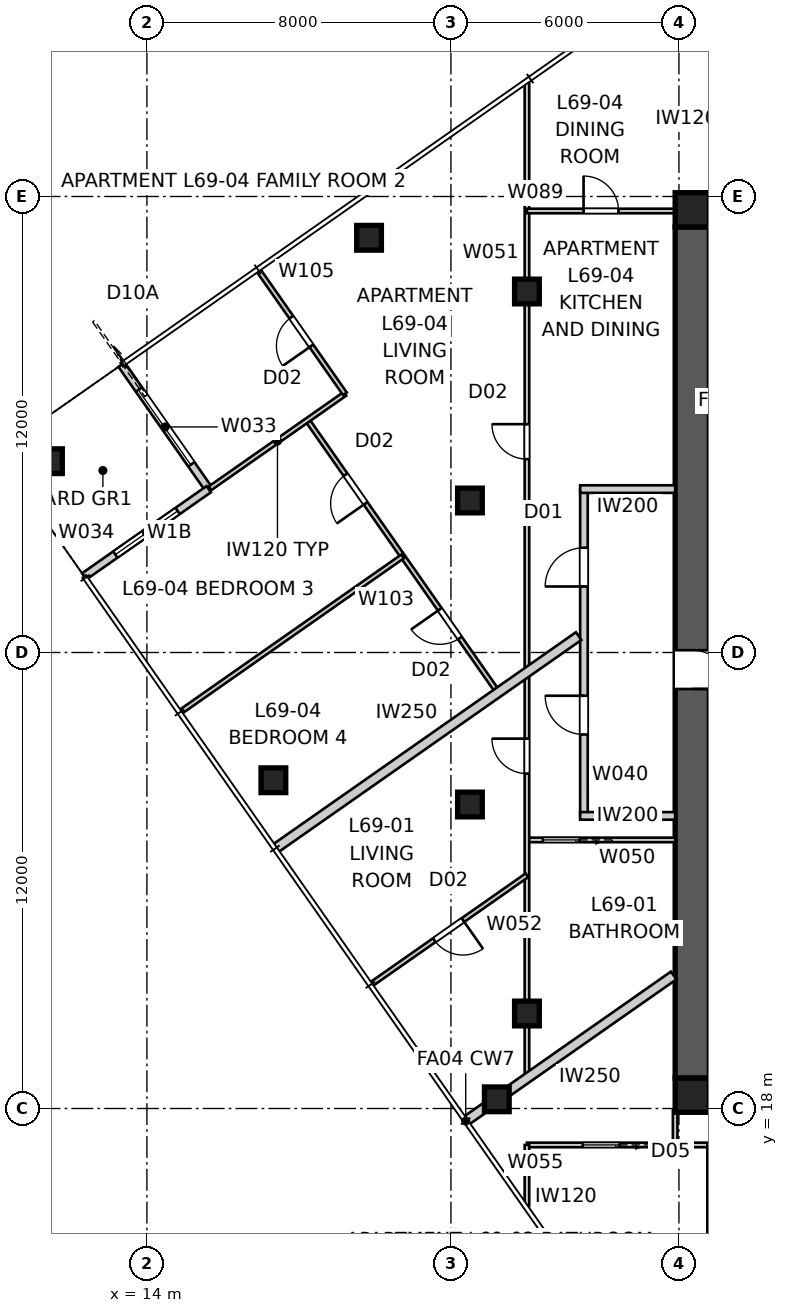
"""IFC4 building model, lengths in metres.
Left out: names, types, materials, properties, quantities, classifications, styles, units other than length and angle.
Written with IfcOpenShell. Run it as: python <this file> out.ifc"""

import sys

from ifc_helpers import new_model, si_unit, direction, frame, frame_2d, origin, origin_2d, place, context, subcontext, project, spatial, polyline, rectangle, outline, extrude, element, fill, save


model = new_model("IFC4")
c1 = context("Model", 3, precision=1e-05, world=origin(), true_north=direction((0.0, 1.0)))
c2 = subcontext(c1, "Body", "Model", "MODEL_VIEW")
j1 = project(units=[si_unit("LENGTHUNIT", "METRE"), si_unit("PLANEANGLEUNIT", "RADIAN")], contexts=[c1])
p1 = place(None, origin())
s1 = spatial("IfcSite", under=j1, at=p1, CompositionType="ELEMENT")
p2 = place(p1, origin())
s2 = spatial("IfcBuilding", under=s1, at=p2, CompositionType="ELEMENT")
p3 = place(p2, frame((0.0, 0.0, 250.6)))
s3 = spatial("IfcBuildingStorey", under=s2, at=p3, CompositionType="ELEMENT", Elevation=250.6)
for number, where, z_axis, x_axis in (
    (1, (28.8, 41.65, 0.0), (0.0, 0.0, 1.0), (1.0, 0.0, 0.0)),
    (2, (51.2, 18.35, 0.0), (0.0, 0.0, 1.0), (-1.0, 0.0, 0.0)),
):
    element("IfcWall", number, at=place(p3, frame(where, z_axis=z_axis, x_axis=x_axis)), inside=s3, PredefinedType="SHEAR", context=c2, shape_type="SweptSolid", body=[
        extrude(outline(polyline([(0.0, -0.45), (22.4, -0.45), (22.4, -0.025), (22.85, -0.025), (22.85, 0.025), (22.4, 0.025), (22.4, 0.45), (0.0, 0.45), (0.0, 0.025), (-0.45, 0.025), (-0.45, -0.025), (0.0, -0.025), (0.0, -0.45)])), origin(), (0.0, 0.0, 1.0), 3.4),
    ])
p4 = place(p3, frame((28.35, 41.2, 0.0), z_axis=(0.0, 0.0, 1.0), x_axis=(0.0, -1.0, 0.0)))
e3 = element("IfcWall", 3, at=p4, inside=s3, PredefinedType="SHEAR", context=c2, shape_type="SweptSolid", body=[
    extrude(outline(polyline([(0.0, -0.45), (22.4, -0.45), (22.4, -0.025), (22.85, -0.025), (22.85, 0.025), (22.4, 0.025), (22.4, 0.45), (0.0, 0.45), (0.0, 0.025), (-0.45, 0.025), (-0.45, -0.025), (0.0, -0.025), (0.0, -0.45)])), origin(), (0.0, 0.0, 1.0), 3.4),
])
p5 = place(p4, frame((11.14, 0.0, 0.0)))
e4 = element("IfcOpeningElement", 4, at=p5, cuts=e3, PredefinedType="OPENING", context=c2, shape_type="SweptSolid", body=[
    extrude(rectangle(XDim=1.02, YDim=2.4, at=frame_2d((0.51, 1.2))), frame((0.0, 0.46, 0.0), z_axis=(0.0, -1.0, 0.0), x_axis=(1.0, 0.0, 0.0)), (0.0, 0.0, 1.0), 0.92),
])
for number, where, z_axis, x_axis in (
    (5, (28.35, 18.35, 0.0), (0.0, 0.0, 1.0), (1.0, 0.0, 0.0)),
    (6, (28.35, 41.65, 0.0), (0.0, 0.0, 1.0), (1.0, 0.0, 0.0)),
):
    element("IfcColumn", number, at=place(p3, frame(where, z_axis=z_axis, x_axis=x_axis)), inside=s3, PredefinedType="COLUMN", context=c2, shape_type="SweptSolid", body=[
        extrude(rectangle(XDim=0.9, YDim=0.9, at=origin_2d()), origin(), (0.0, 0.0, 1.0), 3.4),
    ])
for number, where, z_axis, x_axis in (
    (7, (19.845, 40.914, 0.0), (0.0, 0.0, 1.0), (1.0, 0.0, 0.0)),
    (8, (11.449, 35.034, 0.0), (0.0, 0.0, 1.0), (1.0, 0.0, 0.0)),
    (9, (17.328, 26.638, 0.0), (0.0, 0.0, 1.0), (1.0, 0.0, 0.0)),
    (10, (23.207, 18.242, 0.0), (0.0, 0.0, 1.0), (1.0, 0.0, 0.0)),
    (11, (24.0, 39.5, 0.0), (0.0, 0.0, 1.0), (1.0, 0.0, 0.0)),
    (12, (22.5, 34.0, 0.0), (0.0, 0.0, 1.0), (1.0, 0.0, 0.0)),
    (13, (22.5, 26.0, 0.0), (0.0, 0.0, 1.0), (1.0, 0.0, 0.0)),
    (14, (24.0, 20.5, 0.0), (0.0, 0.0, 1.0), (1.0, 0.0, 0.0)),
):
    element("IfcColumn", number, at=place(p3, frame(where, z_axis=z_axis, x_axis=x_axis)), inside=s3, PredefinedType="COLUMN", context=c2, shape_type="SweptSolid", body=[
        extrude(rectangle(XDim=0.65, YDim=0.65, at=origin_2d()), origin(), (0.0, 0.0, 1.0), 3.4),
    ])
p6 = place(p3, frame((13.333, 37.574, 0.0), z_axis=(0.0, 0.0, 1.0), x_axis=(0.573556557423, -0.819165963305, 0.0)))
e15 = element("IfcWall", 15, at=p6, inside=s3, PredefinedType="SOLIDWALL", context=c2, shape_type="SweptSolid", body=[
    extrude(rectangle(XDim=4.0, YDim=0.2, at=frame_2d((2.0, 0.0))), origin(), (0.0, 0.0, 1.0), 3.25),
])
p7 = place(p6, frame((0.8, 0.0, 0.0)))
e16 = element("IfcOpeningElement", 16, at=p7, cuts=e15, PredefinedType="OPENING", context=c2, shape_type="SweptSolid", body=[
    extrude(rectangle(XDim=2.4, YDim=2.1, at=frame_2d((1.2, 1.05))), frame((0.0, 0.11, 0.0), z_axis=(0.0, -1.0, 0.0), x_axis=(1.0, 0.0, 0.0)), (0.0, 0.0, 1.0), 0.22),
])
p8 = place(p3, frame((15.627, 34.298, 0.0), z_axis=(0.0, 0.0, 1.0), x_axis=(-0.819137286189, -0.573597512525, 0.0)))
e17 = element("IfcWall", 17, at=p8, inside=s3, PredefinedType="SOLIDWALL", context=c2, shape_type="SweptSolid", body=[
    extrude(rectangle(XDim=4.0, YDim=0.2, at=frame_2d((2.0, 0.0))), origin(), (0.0, 0.0, 1.0), 3.25),
])
p9 = place(p8, frame((1.0, 0.0, 0.45)))
e18 = element("IfcOpeningElement", 18, at=p9, cuts=e17, PredefinedType="OPENING", context=c2, shape_type="SweptSolid", body=[
    extrude(rectangle(XDim=2.0, YDim=1.8, at=frame_2d((1.0, 0.9))), frame((0.0, 0.11, 0.0), z_axis=(0.0, -1.0, 0.0), x_axis=(1.0, 0.0, 0.0)), (0.0, 0.0, 1.0), 0.22),
])
p10 = place(p3, frame((25.5, 25.7, 0.0), z_axis=(0.0, 0.0, 1.0), x_axis=(0.0, 1.0, 0.0)))
e19 = element("IfcWall", 19, at=p10, inside=s3, PredefinedType="PARTITIONING", context=c2, shape_type="SweptSolid", body=[
    extrude(rectangle(XDim=8.6, YDim=0.2, at=frame_2d((4.3, 0.0))), origin(), (0.0, 0.0, 1.0), 3.25),
])
p11 = place(p10, frame((2.142, 0.0, 0.0)))
e20 = element("IfcOpeningElement", 20, at=p11, cuts=e19, PredefinedType="OPENING", context=c2, shape_type="SweptSolid", body=[
    extrude(rectangle(XDim=1.02, YDim=2.34, at=frame_2d((0.51, 1.17))), frame((0.0, 0.11, 0.0), z_axis=(0.0, -1.0, 0.0), x_axis=(1.0, 0.0, 0.0)), (0.0, 0.0, 1.0), 0.22),
])
p12 = place(p10, frame((6.037, 0.0, 0.0)))
e21 = element("IfcOpeningElement", 21, at=p12, cuts=e19, PredefinedType="OPENING", context=c2, shape_type="SweptSolid", body=[
    extrude(rectangle(XDim=1.02, YDim=2.34, at=frame_2d((0.51, 1.17))), frame((0.0, 0.11, 0.0), z_axis=(0.0, -1.0, 0.0), x_axis=(1.0, 0.0, 0.0)), (0.0, 0.0, 1.0), 0.22),
])
for number, where, z_axis, x_axis in (
    (22, (27.9, 34.3, 0.0), (0.0, 0.0, 1.0), (-1.0, 0.0, 0.0)),
    (23, (27.9, 25.7, 0.0), (0.0, 0.0, 1.0), (-1.0, 0.0, 0.0)),
):
    element("IfcWall", number, at=place(p3, frame(where, z_axis=z_axis, x_axis=x_axis)), inside=s3, PredefinedType="PARTITIONING", context=c2, shape_type="SweptSolid", body=[
        extrude(rectangle(XDim=2.5, YDim=0.2, at=frame_2d((1.25, 0.0))), origin(), (0.0, 0.0, 1.0), 3.25),
    ])
p13 = place(p3, frame((22.388, 17.668, 0.0), z_axis=(0.0, 0.0, 1.0), x_axis=(0.819161528122, 0.573562891796, 0.0)))
e24 = element("IfcWall", 24, at=p13, inside=s3, PredefinedType="PARTITIONING", context=c2, shape_type="SweptSolid", body=[
    extrude(rectangle(XDim=6.681, YDim=0.25, at=frame_2d((3.341, 0.0))), origin(), (0.0, 0.0, 1.0), 3.25),
])
p14 = place(p3, frame((17.369, 24.836, 0.0), z_axis=(0.0, 0.0, 1.0), x_axis=(0.81915902312, 0.573566469418, 0.0)))
e25 = element("IfcWall", 25, at=p14, inside=s3, PredefinedType="PARTITIONING", context=c2, shape_type="SweptSolid", body=[
    extrude(rectangle(XDim=9.756, YDim=0.25, at=frame_2d((4.878, 0.0))), origin(), (0.0, 0.0, 1.0), 3.25),
])
p15 = place(p3, frame((27.9, 25.068, 0.0), z_axis=(0.0, 0.0, 1.0), x_axis=(-1.0, 0.0, 0.0)))
e26 = element("IfcWall", 26, at=p15, inside=s3, PredefinedType="PARTITIONING", context=c2, shape_type="SweptSolid", body=[
    extrude(rectangle(XDim=3.9, YDim=0.12, at=frame_2d((1.95, 0.0))), origin(), (0.0, 0.0, 1.0), 3.25),
])
p16 = place(p15, frame((2.52, 0.0, 0.0)))
e27 = element("IfcOpeningElement", 27, at=p16, cuts=e26, PredefinedType="OPENING", context=c2, shape_type="SweptSolid", body=[
    extrude(rectangle(XDim=0.96, YDim=2.1, at=frame_2d((0.48, 1.05))), frame((0.0, 0.07, 0.0), z_axis=(0.0, -1.0, 0.0), x_axis=(1.0, 0.0, 0.0)), (0.0, 0.0, 1.0), 0.14),
])
p17 = place(p3, frame((24.0, 18.797, 0.0), z_axis=(0.0, 0.0, 1.0), x_axis=(0.0, 1.0, 0.0)))
e28 = element("IfcWall", 28, at=p17, inside=s3, PredefinedType="PARTITIONING", context=c2, shape_type="SweptSolid", body=[
    extrude(rectangle(XDim=26.198, YDim=0.12, at=frame_2d((13.099, 0.0))), origin(), (0.0, 0.0, 1.0), 2.55),
])
p18 = place(p17, frame((8.016, 0.0, 0.0)))
e29 = element("IfcOpeningElement", 29, at=p18, cuts=e28, PredefinedType="OPENING", context=c2, shape_type="SweptSolid", body=[
    extrude(rectangle(XDim=0.92, YDim=2.34, at=frame_2d((0.46, 1.17))), frame((0.0, 0.07, 0.0), z_axis=(0.0, -1.0, 0.0), x_axis=(1.0, 0.0, 0.0)), (0.0, 0.0, 1.0), 0.14),
])
p19 = place(p17, frame((16.292, 0.0, 0.0)))
e30 = element("IfcOpeningElement", 30, at=p19, cuts=e28, PredefinedType="OPENING", context=c2, shape_type="SweptSolid", body=[
    extrude(rectangle(XDim=0.92, YDim=2.34, at=frame_2d((0.46, 1.17))), frame((0.0, 0.07, 0.0), z_axis=(0.0, -1.0, 0.0), x_axis=(1.0, 0.0, 0.0)), (0.0, 0.0, 1.0), 0.14),
])
p20 = place(p3, frame((24.0, 24.138, 0.0), z_axis=(0.0, 0.0, 1.0), x_axis=(-0.819144584763, -0.57358708951, 0.0)))
e31 = element("IfcWall", 31, at=p20, inside=s3, PredefinedType="PARTITIONING", context=c2, shape_type="SweptSolid", body=[
    extrude(rectangle(XDim=4.991, YDim=0.12, at=frame_2d((2.496, 0.0))), origin(), (0.0, 0.0, 1.0), 3.25),
])
p21 = place(p20, frame((2.055, 0.0, 0.0)))
e32 = element("IfcOpeningElement", 32, at=p21, cuts=e31, PredefinedType="OPENING", context=c2, shape_type="SweptSolid", body=[
    extrude(rectangle(XDim=0.92, YDim=2.34, at=frame_2d((0.46, 1.17))), frame((0.0, 0.07, 0.0), z_axis=(0.0, -1.0, 0.0), x_axis=(1.0, 0.0, 0.0)), (0.0, 0.0, 1.0), 0.14),
])
p22 = place(p3, frame((28.807, 17.041, 0.0), z_axis=(0.0, 0.0, 1.0), x_axis=(-1.0, 0.0, 0.0)))
e33 = element("IfcWall", 33, at=p22, inside=s3, PredefinedType="PARTITIONING", context=c2, shape_type="SweptSolid", body=[
    extrude(rectangle(XDim=4.807, YDim=0.12, at=frame_2d((2.404, 0.0))), origin(), (0.0, 0.0, 1.0), 3.25),
])
p23 = place(p22, frame((2.377, 0.0, 0.0)))
e34 = element("IfcOpeningElement", 34, at=p23, cuts=e33, PredefinedType="OPENING", context=c2, shape_type="SweptSolid", body=[
    extrude(rectangle(XDim=0.96, YDim=2.1, at=frame_2d((0.48, 1.05))), frame((0.0, 0.07, 0.0), z_axis=(0.0, -1.0, 0.0), x_axis=(1.0, 0.0, 0.0)), (0.0, 0.0, 1.0), 0.14),
])
p24 = place(p3, frame((24.0, 17.041, 0.0), z_axis=(0.0, 0.0, 1.0), x_axis=(0.0, -1.0, 0.0)))
e35 = element("IfcWall", 35, at=p24, inside=s3, PredefinedType="PARTITIONING", context=c2, shape_type="SweptSolid", body=[
    extrude(rectangle(XDim=1.605, YDim=0.12, at=frame_2d((0.803, 0.0))), origin(), (0.0, 0.0, 1.0), 3.25),
])
p25 = place(p3, frame((27.9, 17.95, 0.0), z_axis=(0.0, 0.0, 1.0), x_axis=(0.0, -1.0, 0.0)))
e36 = element("IfcWall", 36, at=p25, inside=s3, PredefinedType="PARTITIONING", context=c2, shape_type="SweptSolid", body=[
    extrude(rectangle(XDim=0.909, YDim=0.12, at=frame_2d((0.454, 0.0))), origin(), (0.0, 0.0, 1.0), 3.25),
])
p26 = place(p3, frame((28.807, 17.041, 0.0), z_axis=(0.0, 0.0, 1.0), x_axis=(0.0, -1.0, 0.0)))
e37 = element("IfcWall", 37, at=p26, inside=s3, PredefinedType="PARTITIONING", context=c2, shape_type="SweptSolid", body=[
    extrude(rectangle(XDim=3.041, YDim=0.12, at=frame_2d((1.521, 0.0))), origin(), (0.0, 0.0, 1.0), 3.25),
])
p27 = place(p26, frame((1.041, 0.0, 0.0)))
e38 = element("IfcOpeningElement", 38, at=p27, cuts=e37, PredefinedType="OPENING", context=c2, shape_type="SweptSolid", body=[
    extrude(rectangle(XDim=0.96, YDim=2.1, at=frame_2d((0.48, 1.05))), frame((0.0, 0.07, 0.0), z_axis=(0.0, -1.0, 0.0), x_axis=(1.0, 0.0, 0.0)), (0.0, 0.0, 1.0), 0.14),
])
p28 = place(p3, frame((24.0, 41.619, 0.0), z_axis=(0.0, 0.0, 1.0), x_axis=(1.0, 0.0, 0.0)))
e39 = element("IfcWall", 39, at=p28, inside=s3, PredefinedType="PARTITIONING", context=c2, shape_type="SweptSolid", body=[
    extrude(rectangle(XDim=3.9, YDim=0.12, at=frame_2d((1.95, 0.0))), origin(), (0.0, 0.0, 1.0), 3.25),
])
p29 = place(p28, frame((1.49, 0.0, 0.0)))
e40 = element("IfcOpeningElement", 40, at=p29, cuts=e39, PredefinedType="OPENING", context=c2, shape_type="SweptSolid", body=[
    extrude(rectangle(XDim=0.92, YDim=2.1, at=frame_2d((0.46, 1.05))), frame((0.0, 0.07, 0.0), z_axis=(0.0, -1.0, 0.0), x_axis=(1.0, 0.0, 0.0)), (0.0, 0.0, 1.0), 0.14),
])
p30 = place(p3, frame((23.24, 28.947, 0.0), z_axis=(0.0, 0.0, 1.0), x_axis=(-0.573582185905, 0.819148018378, 0.0)))
e41 = element("IfcWall", 41, at=p30, inside=s3, PredefinedType="PARTITIONING", context=c2, shape_type="SweptSolid", body=[
    extrude(rectangle(XDim=8.75, YDim=0.12, at=frame_2d((4.375, 0.0))), origin(), (0.0, 0.0, 1.0), 3.25),
])
p31 = place(p30, frame((6.078, 0.0, 0.0)))
e42 = element("IfcOpeningElement", 42, at=p31, cuts=e41, PredefinedType="OPENING", context=c2, shape_type="SweptSolid", body=[
    extrude(rectangle(XDim=0.92, YDim=2.34, at=frame_2d((0.46, 1.17))), frame((0.0, 0.07, 0.0), z_axis=(0.0, -1.0, 0.0), x_axis=(1.0, 0.0, 0.0)), (0.0, 0.0, 1.0), 0.14),
])
p32 = place(p30, frame((1.752, 0.0, 0.0)))
e43 = element("IfcOpeningElement", 43, at=p32, cuts=e41, PredefinedType="OPENING", context=c2, shape_type="SweptSolid", body=[
    extrude(rectangle(XDim=0.92, YDim=2.34, at=frame_2d((0.46, 1.17))), frame((0.0, 0.07, 0.0), z_axis=(0.0, -1.0, 0.0), x_axis=(1.0, 0.0, 0.0)), (0.0, 0.0, 1.0), 0.14),
])
p33 = place(p3, frame((15.66, 34.321, 0.0), z_axis=(0.0, 0.0, 1.0), x_axis=(0.819139307094, 0.573594626521, 0.0)))
e44 = element("IfcWall", 44, at=p33, inside=s3, PredefinedType="PARTITIONING", context=c2, shape_type="SweptSolid", body=[
    extrude(rectangle(XDim=4.335, YDim=0.12, at=frame_2d((2.167, 0.0))), origin(), (0.0, 0.0, 1.0), 3.25),
])
p34 = place(p3, frame((19.211, 36.807, 0.0), z_axis=(0.0, 0.0, 1.0), x_axis=(-0.573578200724, 0.819150808859, 0.0)))
e45 = element("IfcWall", 45, at=p34, inside=s3, PredefinedType="PARTITIONING", context=c2, shape_type="SweptSolid", body=[
    extrude(rectangle(XDim=3.96, YDim=0.12, at=frame_2d((1.98, 0.0))), origin(), (0.0, 0.0, 1.0), 3.25),
])
p35 = place(p34, frame((1.54, 0.0, 0.0)))
e46 = element("IfcOpeningElement", 46, at=p35, cuts=e45, PredefinedType="OPENING", context=c2, shape_type="SweptSolid", body=[
    extrude(rectangle(XDim=0.92, YDim=2.34, at=frame_2d((0.46, 1.17))), frame((0.0, 0.07, 0.0), z_axis=(0.0, -1.0, 0.0), x_axis=(1.0, 0.0, 0.0)), (0.0, 0.0, 1.0), 0.14),
])
p36 = place(p3, frame((20.731, 32.53, 0.0), z_axis=(0.0, 0.0, 1.0), x_axis=(-0.819153056029, -0.573574991434, 0.0)))
e47 = element("IfcWall", 47, at=p36, inside=s3, PredefinedType="PARTITIONING", context=c2, shape_type="SweptSolid", body=[
    extrude(rectangle(XDim=7.127, YDim=0.12, at=frame_2d((3.563, 0.0))), origin(), (0.0, 0.0, 1.0), 3.25),
])
p37 = place(p3, frame((27.9, 41.619, 0.0), z_axis=(0.0, 0.0, 1.0), x_axis=(0.999397924003, 0.034695669724, 0.0)))
e48 = element("IfcWall", 48, at=p37, inside=s3, PredefinedType="PARTITIONING", context=c2, shape_type="SweptSolid", body=[
    extrude(rectangle(XDim=0.901, YDim=0.12, at=frame_2d((0.45, 0.0))), origin(), (0.0, 0.0, 1.0), 3.25),
])
p38 = place(p7, origin())
e49 = element("IfcDoor", 49, at=p38, inside=s3, OperationType="SLIDING_TO_LEFT", PredefinedType="DOOR", context=c2, shape_type="SweptSolid", body=[
    extrude(rectangle(XDim=2.4, YDim=2.1, at=frame_2d((1.2, 1.05))), frame((0.0, 0.025, 0.0), z_axis=(0.0, -1.0, 0.0), x_axis=(1.0, 0.0, 0.0)), (0.0, 0.0, 1.0), 0.05),
])
fill(e16, e49)
p39 = place(p9, origin())
e50 = element("IfcWindow", 50, at=p39, inside=s3, PartitioningType="SINGLE_PANEL", PredefinedType="WINDOW", context=c2, shape_type="SweptSolid", body=[
    extrude(rectangle(XDim=2.0, YDim=1.8, at=frame_2d((1.0, 0.9))), frame((0.0, 0.03, 0.0), z_axis=(0.0, -1.0, 0.0), x_axis=(1.0, 0.0, 0.0)), (0.0, 0.0, 1.0), 0.06),
])
fill(e18, e50)
p40 = place(p11, origin())
e51 = element("IfcDoor", 51, at=p40, inside=s3, OperationType="SINGLE_SWING_RIGHT", PredefinedType="DOOR", context=c2, shape_type="SweptSolid", body=[
    extrude(rectangle(XDim=1.02, YDim=2.34, at=frame_2d((0.51, 1.17))), frame((0.0, 0.025, 0.0), z_axis=(0.0, -1.0, 0.0), x_axis=(1.0, 0.0, 0.0)), (0.0, 0.0, 1.0), 0.05),
])
fill(e20, e51)
p41 = place(p12, origin())
e52 = element("IfcDoor", 52, at=p41, inside=s3, OperationType="SINGLE_SWING_LEFT", PredefinedType="DOOR", context=c2, shape_type="SweptSolid", body=[
    extrude(rectangle(XDim=1.02, YDim=2.34, at=frame_2d((0.51, 1.17))), frame((0.0, 0.025, 0.0), z_axis=(0.0, -1.0, 0.0), x_axis=(1.0, 0.0, 0.0)), (0.0, 0.0, 1.0), 0.05),
])
fill(e21, e52)
p42 = place(p18, origin())
e53 = element("IfcDoor", 53, at=p42, inside=s3, OperationType="SINGLE_SWING_RIGHT", PredefinedType="DOOR", context=c2, shape_type="SweptSolid", body=[
    extrude(rectangle(XDim=0.92, YDim=2.34, at=frame_2d((0.46, 1.17))), frame((0.0, 0.025, 0.0), z_axis=(0.0, -1.0, 0.0), x_axis=(1.0, 0.0, 0.0)), (0.0, 0.0, 1.0), 0.05),
])
fill(e29, e53)
p43 = place(p16, origin())
e54 = element("IfcDoor", 54, at=p43, inside=s3, OperationType="SLIDING_TO_LEFT", PredefinedType="DOOR", context=c2, shape_type="SweptSolid", body=[
    extrude(rectangle(XDim=0.96, YDim=2.1, at=frame_2d((0.48, 1.05))), frame((0.0, 0.025, 0.0), z_axis=(0.0, -1.0, 0.0), x_axis=(1.0, 0.0, 0.0)), (0.0, 0.0, 1.0), 0.05),
])
fill(e27, e54)
p44 = place(p19, origin())
e55 = element("IfcDoor", 55, at=p44, inside=s3, OperationType="SINGLE_SWING_RIGHT", PredefinedType="DOOR", context=c2, shape_type="SweptSolid", body=[
    extrude(rectangle(XDim=0.92, YDim=2.34, at=frame_2d((0.46, 1.17))), frame((0.0, 0.025, 0.0), z_axis=(0.0, -1.0, 0.0), x_axis=(1.0, 0.0, 0.0)), (0.0, 0.0, 1.0), 0.05),
])
fill(e30, e55)
p45 = place(p29, origin())
e56 = element("IfcDoor", 56, at=p45, inside=s3, OperationType="SINGLE_SWING_LEFT", PredefinedType="DOOR", context=c2, shape_type="SweptSolid", body=[
    extrude(rectangle(XDim=0.92, YDim=2.1, at=frame_2d((0.46, 1.05))), frame((0.0, 0.025, 0.0), z_axis=(0.0, -1.0, 0.0), x_axis=(1.0, 0.0, 0.0)), (0.0, 0.0, 1.0), 0.05),
])
fill(e40, e56)
p46 = place(p21, origin())
e57 = element("IfcDoor", 57, at=p46, inside=s3, OperationType="SINGLE_SWING_LEFT", PredefinedType="DOOR", context=c2, shape_type="SweptSolid", body=[
    extrude(rectangle(XDim=0.92, YDim=2.34, at=frame_2d((0.46, 1.17))), frame((0.0, 0.025, 0.0), z_axis=(0.0, -1.0, 0.0), x_axis=(1.0, 0.0, 0.0)), (0.0, 0.0, 1.0), 0.05),
])
fill(e32, e57)
p47 = place(p31, origin())
e58 = element("IfcDoor", 58, at=p47, inside=s3, OperationType="SINGLE_SWING_LEFT", PredefinedType="DOOR", context=c2, shape_type="SweptSolid", body=[
    extrude(rectangle(XDim=0.92, YDim=2.34, at=frame_2d((0.46, 1.17))), frame((0.0, 0.025, 0.0), z_axis=(0.0, -1.0, 0.0), x_axis=(1.0, 0.0, 0.0)), (0.0, 0.0, 1.0), 0.05),
])
fill(e42, e58)
p48 = place(p32, origin())
e59 = element("IfcDoor", 59, at=p48, inside=s3, OperationType="SINGLE_SWING_RIGHT", PredefinedType="DOOR", context=c2, shape_type="SweptSolid", body=[
    extrude(rectangle(XDim=0.92, YDim=2.34, at=frame_2d((0.46, 1.17))), frame((0.0, 0.025, 0.0), z_axis=(0.0, -1.0, 0.0), x_axis=(1.0, 0.0, 0.0)), (0.0, 0.0, 1.0), 0.05),
])
fill(e43, e59)
p49 = place(p35, origin())
e60 = element("IfcDoor", 60, at=p49, inside=s3, OperationType="SINGLE_SWING_LEFT", PredefinedType="DOOR", context=c2, shape_type="SweptSolid", body=[
    extrude(rectangle(XDim=0.92, YDim=2.34, at=frame_2d((0.46, 1.17))), frame((0.0, 0.025, 0.0), z_axis=(0.0, -1.0, 0.0), x_axis=(1.0, 0.0, 0.0)), (0.0, 0.0, 1.0), 0.05),
])
fill(e46, e60)
p50 = place(p23, origin())
e61 = element("IfcDoor", 61, at=p50, inside=s3, OperationType="SLIDING_TO_LEFT", PredefinedType="DOOR", context=c2, shape_type="SweptSolid", body=[
    extrude(rectangle(XDim=0.96, YDim=2.1, at=frame_2d((0.48, 1.05))), frame((0.0, 0.025, 0.0), z_axis=(0.0, -1.0, 0.0), x_axis=(1.0, 0.0, 0.0)), (0.0, 0.0, 1.0), 0.05),
])
fill(e34, e61)
p51 = place(p5, origin())
e62 = element("IfcDoor", 62, at=p51, inside=s3, OperationType="SINGLE_SWING_RIGHT", PredefinedType="DOOR", context=c2, shape_type="SweptSolid", body=[
    extrude(rectangle(XDim=1.02, YDim=2.4, at=frame_2d((0.51, 1.2))), frame((0.0, 0.025, 0.0), z_axis=(0.0, -1.0, 0.0), x_axis=(1.0, 0.0, 0.0)), (0.0, 0.0, 1.0), 0.05),
])
fill(e4, e62)
save(model, sys.argv[1])
